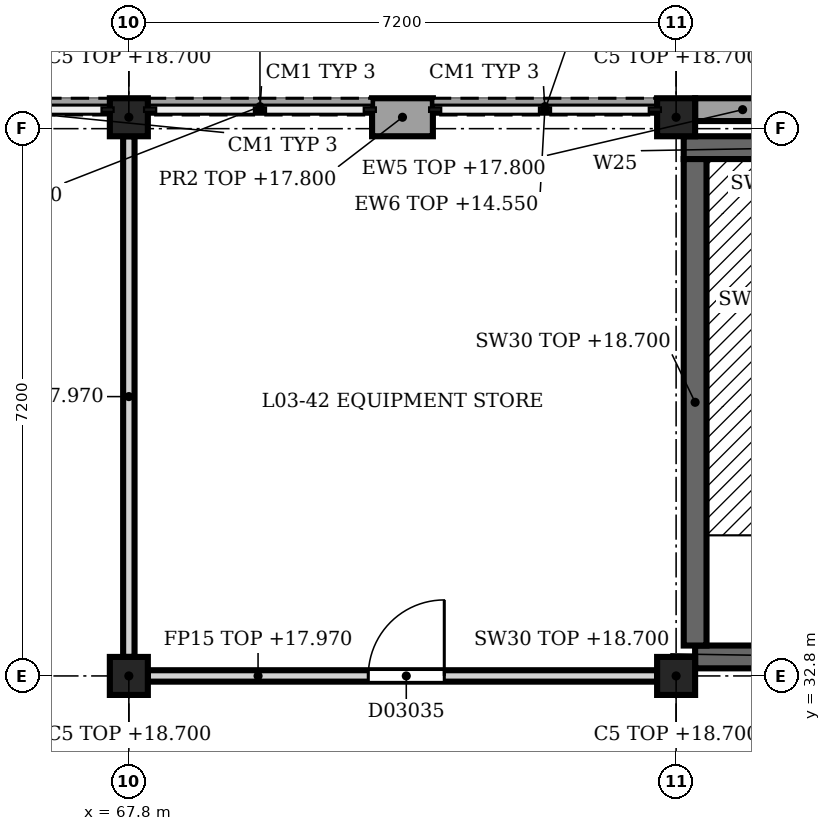
"""IFC4 building model, lengths in metres.
Left out: names, types, materials, properties, quantities, classifications, styles, units other than length and angle.
Written with IfcOpenShell. Run it as: python <this file> out.ifc"""

import sys

from ifc_helpers import new_model, si_unit, direction, frame, frame_2d, origin, origin_2d, place, context, subcontext, project, spatial, rectangle, extrude, element, fill, save


model = new_model("IFC4")
c1 = context("Model", 3, precision=1e-05, world=origin(), true_north=direction((0.0, 1.0)))
c2 = subcontext(c1, "Body", "Model", "MODEL_VIEW")
j1 = project(units=[si_unit("LENGTHUNIT", "METRE"), si_unit("PLANEANGLEUNIT", "RADIAN")], contexts=[c1])
p1 = place(None, origin())
s1 = spatial("IfcSite", under=j1, at=p1, CompositionType="ELEMENT")
p2 = place(p1, origin())
s2 = spatial("IfcBuilding", under=s1, at=p2, CompositionType="ELEMENT")
p3 = place(p2, frame((0.0, 0.0, 14.4)))
s3 = spatial("IfcBuildingStorey", under=s2, at=p3, CompositionType="ELEMENT", Elevation=14.4)
for number, where, z_axis, x_axis in (
    (1, (67.8, 32.8, 0.0), (0.0, 0.0, 1.0), (1.0, 0.0, 0.0)),
    (2, (67.8, 40.15, 0.0), (0.0, 0.0, 1.0), (1.0, 0.0, 0.0)),
    (3, (75.0, 32.8, 0.0), (0.0, 0.0, 1.0), (1.0, 0.0, 0.0)),
    (4, (75.0, 40.15, 0.0), (0.0, 0.0, 1.0), (1.0, 0.0, 0.0)),
):
    element("IfcColumn", number, at=place(p3, frame(where, z_axis=z_axis, x_axis=x_axis)), inside=s3, PredefinedType="COLUMN", context=c2, shape_type="SweptSolid", body=[
        extrude(rectangle(XDim=0.5, YDim=0.5, at=origin_2d()), origin(), (0.0, 0.0, 1.0), 4.3),
    ])
p4 = place(p3, frame((71.0, 40.15, 0.0), z_axis=(0.0, 0.0, 1.0), x_axis=(1.0, 0.0, 0.0)))
e5 = element("IfcWall", 5, at=p4, inside=s3, PredefinedType="SOLIDWALL", context=c2, shape_type="SweptSolid", body=[
    extrude(rectangle(XDim=0.8, YDim=0.5, at=frame_2d((0.4, 0.0))), origin(), (0.0, 0.0, 1.0), 3.4),
])
p5 = place(p3, frame((64.5, 40.29, 0.0), z_axis=(0.0, 0.0, 1.0), x_axis=(1.0, 0.0, 0.0)))
e6 = element("IfcWall", 6, at=p5, inside=s3, PredefinedType="SOLIDWALL", context=c2, shape_type="SweptSolid", body=[
    extrude(rectangle(XDim=3.05, YDim=0.22, at=frame_2d((1.525, 0.0))), origin(), (0.0, 0.0, 1.0), 0.45),
])
p6 = place(p3, frame((68.05, 40.29, 0.0), z_axis=(0.0, 0.0, 1.0), x_axis=(1.0, 0.0, 0.0)))
e7 = element("IfcWall", 7, at=p6, inside=s3, PredefinedType="SOLIDWALL", context=c2, shape_type="SweptSolid", body=[
    extrude(rectangle(XDim=2.95, YDim=0.22, at=frame_2d((1.475, 0.0))), origin(), (0.0, 0.0, 1.0), 0.45),
])
p7 = place(p3, frame((71.8, 40.29, 0.0), z_axis=(0.0, 0.0, 1.0), x_axis=(1.0, 0.0, 0.0)))
e8 = element("IfcWall", 8, at=p7, inside=s3, PredefinedType="SOLIDWALL", context=c2, shape_type="SweptSolid", body=[
    extrude(rectangle(XDim=2.95, YDim=0.22, at=frame_2d((1.475, 0.0))), origin(), (0.0, 0.0, 1.0), 0.15),
])
p8 = place(p3, frame((75.25, 40.25, 0.0), z_axis=(0.0, 0.0, 1.0), x_axis=(1.0, 0.0, 0.0)))
e9 = element("IfcWall", 9, at=p8, inside=s3, PredefinedType="SOLIDWALL", context=c2, shape_type="SweptSolid", body=[
    extrude(rectangle(XDim=2.95, YDim=0.3, at=frame_2d((1.475, 0.0))), origin(), (0.0, 0.0, 1.0), 3.4),
])
p9 = place(p8, frame((1.25, 0.0, 1.2)))
e10 = element("IfcOpeningElement", 10, at=p9, cuts=e9, PredefinedType="OPENING", context=c2, shape_type="SweptSolid", body=[
    extrude(rectangle(XDim=0.6, YDim=1.8, at=frame_2d((0.3, 0.9))), frame((0.0, 0.16, 0.0), z_axis=(0.0, -1.0, 0.0), x_axis=(1.0, 0.0, 0.0)), (0.0, 0.0, 1.0), 0.32),
])
p10 = place(p3, frame((75.25, 33.05, 0.0), z_axis=(0.0, 0.0, 1.0), x_axis=(1.0, 0.0, 0.0)))
e11 = element("IfcWall", 11, at=p10, inside=s3, PredefinedType="SHEAR", context=c2, shape_type="SweptSolid", body=[
    extrude(rectangle(XDim=6.575, YDim=0.3, at=frame_2d((3.288, 0.0))), origin(), (0.0, 0.0, 1.0), 4.3),
])
p11 = place(p10, frame((4.35, 0.0, 0.0)))
e12 = element("IfcOpeningElement", 12, at=p11, cuts=e11, PredefinedType="OPENING", context=c2, shape_type="SweptSolid", body=[
    extrude(rectangle(XDim=1.2, YDim=2.1, at=frame_2d((0.6, 1.05))), frame((0.0, 0.16, 0.0), z_axis=(0.0, -1.0, 0.0), x_axis=(1.0, 0.0, 0.0)), (0.0, 0.0, 1.0), 0.32),
])
p12 = place(p3, frame((75.1, 39.75, 0.0), z_axis=(0.0, 0.0, 1.0), x_axis=(1.0, 0.0, 0.0)))
e13 = element("IfcWall", 13, at=p12, inside=s3, PredefinedType="SHEAR", context=c2, shape_type="SweptSolid", body=[
    extrude(rectangle(XDim=7.0, YDim=0.3, at=frame_2d((3.5, 0.0))), origin(), (0.0, 0.0, 1.0), 4.3),
])
p13 = place(p12, frame((1.4, 0.0, 1.2)))
e14 = element("IfcOpeningElement", 14, at=p13, cuts=e13, PredefinedType="OPENING", context=c2, shape_type="SweptSolid", body=[
    extrude(rectangle(XDim=0.6, YDim=1.8, at=frame_2d((0.3, 0.9))), frame((0.0, 0.16, 0.0), z_axis=(0.0, -1.0, 0.0), x_axis=(1.0, 0.0, 0.0)), (0.0, 0.0, 1.0), 0.32),
])
p14 = place(p3, frame((75.25, 33.2, 0.0), z_axis=(0.0, 0.0, 1.0), x_axis=(0.0, 1.0, 0.0)))
e15 = element("IfcWall", 15, at=p14, inside=s3, PredefinedType="SHEAR", context=c2, shape_type="SweptSolid", body=[
    extrude(rectangle(XDim=6.4, YDim=0.3, at=frame_2d((3.2, 0.0))), origin(), (0.0, 0.0, 1.0), 4.3),
])
p15 = place(p3, frame((68.05, 32.8, 0.0), z_axis=(0.0, 0.0, 1.0), x_axis=(1.0, 0.0, 0.0)))
e16 = element("IfcWall", 16, at=p15, inside=s3, PredefinedType="PARTITIONING", context=c2, shape_type="SweptSolid", body=[
    extrude(rectangle(XDim=6.7, YDim=0.15, at=frame_2d((3.35, 0.0))), origin(), (0.0, 0.0, 1.0), 3.57),
])
p16 = place(p15, frame((2.9, 0.0, 0.0)))
e17 = element("IfcOpeningElement", 17, at=p16, cuts=e16, PredefinedType="OPENING", context=c2, shape_type="SweptSolid", body=[
    extrude(rectangle(XDim=1.0, YDim=2.1, at=frame_2d((0.5, 1.05))), frame((0.0, 0.085, 0.0), z_axis=(0.0, -1.0, 0.0), x_axis=(1.0, 0.0, 0.0)), (0.0, 0.0, 1.0), 0.17),
])
p17 = place(p3, frame((67.8, 33.05, 0.0), z_axis=(0.0, 0.0, 1.0), x_axis=(0.0, 1.0, 0.0)))
e18 = element("IfcWall", 18, at=p17, inside=s3, PredefinedType="PARTITIONING", context=c2, shape_type="SweptSolid", body=[
    extrude(rectangle(XDim=6.85, YDim=0.15, at=frame_2d((3.425, 0.0))), origin(), (0.0, 0.0, 1.0), 3.57),
])
p18 = place(p16, origin())
e19 = element("IfcDoor", 19, at=p18, inside=s3, OperationType="SINGLE_SWING_RIGHT", PredefinedType="DOOR", context=c2, shape_type="SweptSolid", body=[
    extrude(rectangle(XDim=1.0, YDim=2.1, at=frame_2d((0.5, 1.05))), frame((0.0, 0.025, 0.0), z_axis=(0.0, -1.0, 0.0), x_axis=(1.0, 0.0, 0.0)), (0.0, 0.0, 1.0), 0.05),
])
fill(e17, e19)
save(model, sys.argv[1])
